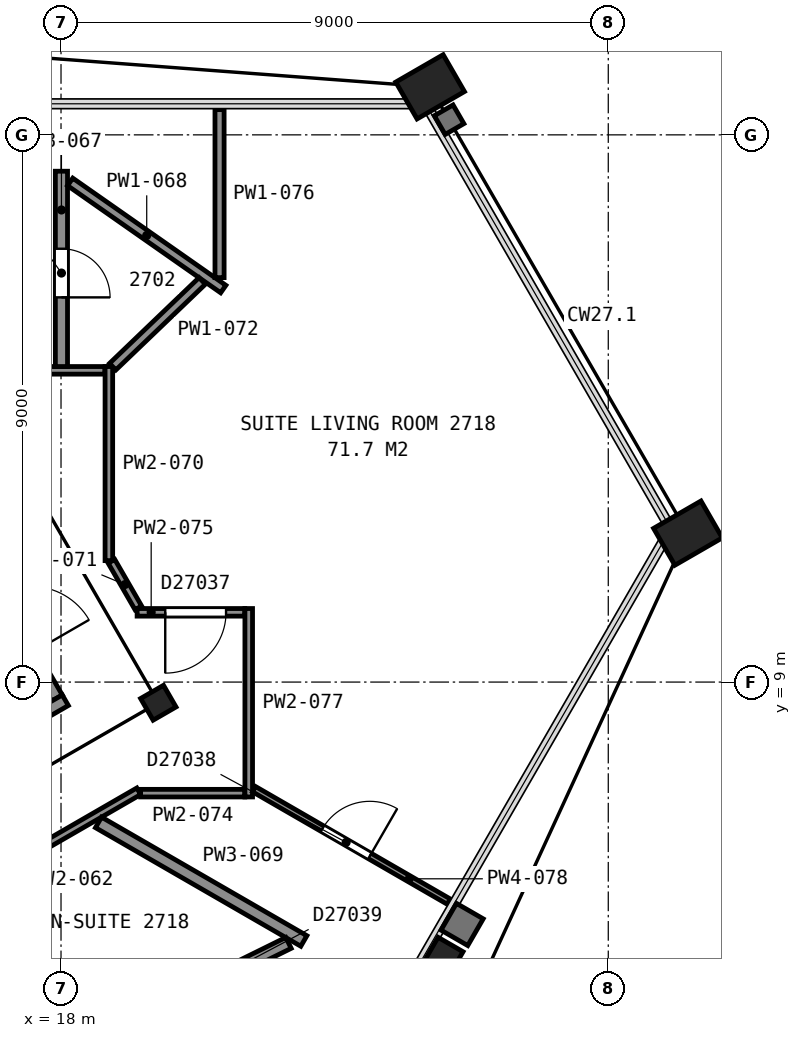
"""IFC4 building model, lengths in metres.
Left out: names, types, materials, properties, quantities, classifications, styles, units other than length and angle.
Written with IfcOpenShell. Run it as: python <this file> out.ifc"""

import sys

from ifc_helpers import new_model, si_unit, direction, frame, frame_2d, origin, origin_2d, place, context, subcontext, project, spatial, rectangle, hollow_rectangle, i_section, extrude, element, fill, save


model = new_model("IFC4")
c1 = context("Model", 3, precision=1e-05, world=origin(), true_north=direction((0.0, 1.0)))
c2 = subcontext(c1, "Body", "Model", "MODEL_VIEW")
j1 = project(units=[si_unit("LENGTHUNIT", "METRE"), si_unit("PLANEANGLEUNIT", "RADIAN")], contexts=[c1])
p1 = place(None, origin())
s1 = spatial("IfcSite", under=j1, at=p1, CompositionType="ELEMENT")
p2 = place(p1, origin())
s2 = spatial("IfcBuilding", under=s1, at=p2, CompositionType="ELEMENT")
p3 = place(p2, frame((0.0, 0.0, 114.4)))
s3 = spatial("IfcBuildingStorey", under=s2, at=p3, CompositionType="ELEMENT", Elevation=114.4)
p4 = place(p3, frame((24.07, 18.79, 0.0), z_axis=(0.0, 0.0, 1.0), x_axis=(0.5, -0.866025403784, 0.0)))
e1 = element("IfcColumn", 1, at=p4, inside=s3, PredefinedType="COLUMN", context=c2, shape_type="SweptSolid", body=[
    extrude(hollow_rectangle(XDim=0.7, YDim=0.9, WallThickness=0.065, at=origin_2d()), origin(), (0.0, 0.0, 1.0), 3.525),
])
p5 = place(p3, frame((24.3, 4.5, 0.0), z_axis=(0.0, 0.0, 1.0), x_axis=(-0.5, -0.866025403784, 0.0)))
e2 = element("IfcColumn", 2, at=p5, inside=s3, PredefinedType="COLUMN", context=c2, shape_type="SweptSolid", body=[
    extrude(i_section(OverallWidth=0.424, OverallDepth=0.475, WebThickness=0.048, FlangeThickness=0.077, FilletRadius=0.015, at=origin_2d()), origin(), (0.0, 0.0, 1.0), 3.555),
])
p6 = place(p3, frame((28.31, 11.45, 0.0), z_axis=(0.0, 0.0, 1.0), x_axis=(0.5, -0.866025403784, 0.0)))
e3 = element("IfcColumn", 3, at=p6, inside=s3, PredefinedType="COLUMN", context=c2, shape_type="SweptSolid", body=[
    extrude(hollow_rectangle(XDim=0.7, YDim=0.9, WallThickness=0.065, at=origin_2d()), origin(), (0.0, 0.0, 1.0), 3.525),
])
p7 = place(p3, frame((19.6, 8.66, 0.0), z_axis=(0.0, 0.0, 1.0), x_axis=(0.5, -0.866025403784, 0.0)))
e4 = element("IfcColumn", 4, at=p7, inside=s3, PredefinedType="COLUMN", context=c2, shape_type="SweptSolid", body=[
    extrude(i_section(OverallWidth=0.411, OverallDepth=0.434, WebThickness=0.036, FlangeThickness=0.057, FilletRadius=0.015, at=origin_2d()), origin(), (0.0, 0.0, 1.0), 3.6),
])
p8 = place(p3, frame((17.934, 8.738, 0.0), z_axis=(0.0, 0.0, 1.0), x_axis=(-0.49998411664, 0.866034573852, 0.0)))
e5 = element("IfcWall", 5, at=p8, inside=s3, PredefinedType="PARTITIONING", context=c2, shape_type="SweptSolid", body=[
    extrude(rectangle(XDim=2.8, YDim=0.2, at=frame_2d((1.4, 0.0))), origin(), (0.0, 0.0, 1.0), 3.35),
])
p9 = place(p8, frame((0.85, 0.0, 0.0)))
e6 = element("IfcOpeningElement", 6, at=p9, cuts=e5, PredefinedType="OPENING", context=c2, shape_type="SweptSolid", body=[
    extrude(rectangle(XDim=1.1, YDim=2.1, at=frame_2d((0.55, 1.05))), frame((0.0, 0.11, 0.0), z_axis=(0.0, -1.0, 0.0), x_axis=(1.0, 0.0, 0.0)), (0.0, 0.0, 1.0), 0.22),
])
p10 = place(p3, frame((7.678, 2.701, 0.0), z_axis=(0.0, 0.0, 1.0), x_axis=(0.866026010844, 0.49999894854, 0.0)))
e7 = element("IfcWall", 7, at=p10, inside=s3, PredefinedType="PARTITIONING", context=c2, shape_type="SweptSolid", body=[
    extrude(rectangle(XDim=12.0, YDim=0.2, at=frame_2d((6.0, 0.0))), origin(), (0.0, 0.0, 1.0), 3.35),
])
p11 = place(p3, frame((15.727, 5.154, 0.0), z_axis=(0.0, 0.0, 1.0), x_axis=(0.865992261418, 0.50005739987, 0.0)))
e8 = element("IfcWall", 8, at=p11, inside=s3, PredefinedType="PARTITIONING", context=c2, shape_type="SweptSolid", body=[
    extrude(rectangle(XDim=4.101, YDim=0.125, at=frame_2d((2.051, 0.0))), origin(), (0.0, 0.0, 1.0), 2.613),
])
p12 = place(p3, frame((15.75, 14.127, 0.0), z_axis=(0.0, 0.0, 1.0), x_axis=(1.0, 0.0, 0.0)))
e9 = element("IfcWall", 9, at=p12, inside=s3, PredefinedType="PARTITIONING", context=c2, shape_type="SweptSolid", body=[
    extrude(rectangle(XDim=2.971, YDim=0.125, at=frame_2d((1.486, 0.0))), origin(), (0.0, 0.0, 1.0), 2.613),
])
p13 = place(p3, frame((16.004, 5.198, 0.0), z_axis=(0.0, 0.0, 1.0), x_axis=(0.866025331845, -0.500000124603, 0.0)))
e10 = element("IfcWall", 10, at=p13, inside=s3, PredefinedType="PARTITIONING", context=c2, shape_type="SweptSolid", body=[
    extrude(rectangle(XDim=7.154, YDim=0.15, at=frame_2d((3.577, 0.0))), origin(), (0.0, 0.0, 1.0), 2.613),
])
p14 = place(p3, frame((18.007, 17.402, 0.0), z_axis=(0.0, 0.0, 1.0), x_axis=(0.0, -1.0, 0.0)))
e11 = element("IfcWall", 11, at=p14, inside=s3, PredefinedType="PARTITIONING", context=c2, shape_type="SweptSolid", body=[
    extrude(rectangle(XDim=3.213, YDim=0.2, at=frame_2d((1.606, 0.0))), origin(), (0.0, 0.0, 1.0), 2.613),
])
p15 = place(p14, frame((1.275, 0.0, 0.0)))
e12 = element("IfcOpeningElement", 12, at=p15, cuts=e11, PredefinedType="OPENING", context=c2, shape_type="SweptSolid", body=[
    extrude(rectangle(XDim=0.8, YDim=2.1, at=frame_2d((0.4, 1.05))), frame((0.0, 0.11, 0.0), z_axis=(0.0, -1.0, 0.0), x_axis=(1.0, 0.0, 0.0)), (0.0, 0.0, 1.0), 0.22),
])
p16 = place(p3, frame((18.15, 17.227, 0.0), z_axis=(0.0, 0.0, 1.0), x_axis=(0.819261773051, -0.573419695526, 0.0)))
e13 = element("IfcWall", 13, at=p16, inside=s3, PredefinedType="PARTITIONING", context=c2, shape_type="SweptSolid", body=[
    extrude(rectangle(XDim=3.073, YDim=0.15, at=frame_2d((1.537, 0.0))), origin(), (0.0, 0.0, 1.0), 2.613),
])
p17 = place(p3, frame((18.616, 6.692, 0.0), z_axis=(0.0, 0.0, 1.0), x_axis=(0.865984367075, -0.500071070931, 0.0)))
e14 = element("IfcWall", 14, at=p17, inside=s3, PredefinedType="PARTITIONING", context=c2, shape_type="SweptSolid", body=[
    extrude(rectangle(XDim=3.9, YDim=0.2, at=frame_2d((1.95, 0.0))), origin(), (0.0, 0.0, 1.0), 2.613),
])
p18 = place(p3, frame((18.787, 10.998, 0.0), z_axis=(0.0, 0.0, 1.0), x_axis=(0.0, 1.0, 0.0)))
e15 = element("IfcWall", 15, at=p18, inside=s3, PredefinedType="PARTITIONING", context=c2, shape_type="SweptSolid", body=[
    extrude(rectangle(XDim=3.192, YDim=0.125, at=frame_2d((1.596, 0.0))), origin(), (0.0, 0.0, 1.0), 2.613),
])
p19 = place(p3, frame((18.83, 10.986, 0.0), z_axis=(0.0, 0.0, 1.0), x_axis=(0.499881837328, -0.866093614288, 0.0)))
e16 = element("IfcWall", 16, at=p19, inside=s3, PredefinedType="PARTITIONING", context=c2, shape_type="SweptSolid", body=[
    extrude(rectangle(XDim=0.884, YDim=0.125, at=frame_2d((0.442, 0.0))), origin(), (0.0, 0.0, 1.0), 2.613),
])
p20 = place(p3, frame((18.85, 14.188, 0.0), z_axis=(0.0, 0.0, 1.0), x_axis=(0.722035565689, 0.69185594012, 0.0)))
e17 = element("IfcWall", 17, at=p20, inside=s3, PredefinedType="PARTITIONING", context=c2, shape_type="SweptSolid", body=[
    extrude(rectangle(XDim=2.039, YDim=0.15, at=frame_2d((1.019, 0.0))), origin(), (0.0, 0.0, 1.0), 2.613),
])
p21 = place(p3, frame((19.245, 3.479, 0.0), z_axis=(0.0, 0.0, 1.0), x_axis=(0.896782684503, 0.44247126096, 0.0)))
e18 = element("IfcWall", 18, at=p21, inside=s3, PredefinedType="PARTITIONING", context=c2, shape_type="SweptSolid", body=[
    extrude(rectangle(XDim=2.784, YDim=0.2, at=frame_2d((1.392, 0.0))), origin(), (0.0, 0.0, 1.0), 2.613),
])
p22 = place(p21, frame((0.993, 0.0, 0.0)))
e19 = element("IfcOpeningElement", 19, at=p22, cuts=e18, PredefinedType="OPENING", context=c2, shape_type="SweptSolid", body=[
    extrude(rectangle(XDim=0.8, YDim=2.1, at=frame_2d((0.4, 1.05))), frame((0.0, 0.11, 0.0), z_axis=(0.0, -1.0, 0.0), x_axis=(1.0, 0.0, 0.0)), (0.0, 0.0, 1.0), 0.22),
])
p23 = place(p3, frame((19.309, 7.173, 0.0), z_axis=(0.0, 0.0, 1.0), x_axis=(1.0, 0.0, 0.0)))
e20 = element("IfcWall", 20, at=p23, inside=s3, PredefinedType="PARTITIONING", context=c2, shape_type="SweptSolid", body=[
    extrude(rectangle(XDim=1.713, YDim=0.125, at=frame_2d((0.856, 0.0))), origin(), (0.0, 0.0, 1.0), 2.613),
])
p24 = place(p3, frame((19.251, 10.147, 0.0), z_axis=(0.0, 0.0, 1.0), x_axis=(1.0, 0.0, 0.0)))
e21 = element("IfcWall", 21, at=p24, inside=s3, PredefinedType="PARTITIONING", context=c2, shape_type="SweptSolid", body=[
    extrude(rectangle(XDim=1.771, YDim=0.125, at=frame_2d((0.885, 0.0))), origin(), (0.0, 0.0, 1.0), 2.613),
])
p25 = place(p24, frame((0.462, 0.0, 0.0)))
e22 = element("IfcOpeningElement", 22, at=p25, cuts=e21, PredefinedType="OPENING", context=c2, shape_type="SweptSolid", body=[
    extrude(rectangle(XDim=1.0, YDim=2.1, at=frame_2d((0.5, 1.05))), frame((0.0, 0.073, 0.0), z_axis=(0.0, -1.0, 0.0), x_axis=(1.0, 0.0, 0.0)), (0.0, 0.0, 1.0), 0.145),
])
p26 = place(p3, frame((20.607, 15.652, 0.0), z_axis=(0.0, 0.0, 1.0), x_axis=(0.0, 1.0, 0.0)))
e23 = element("IfcWall", 23, at=p26, inside=s3, PredefinedType="PARTITIONING", context=c2, shape_type="SweptSolid", body=[
    extrude(rectangle(XDim=2.763, YDim=0.15, at=frame_2d((1.381, 0.0))), origin(), (0.0, 0.0, 1.0), 2.613),
])
p27 = place(p3, frame((21.087, 7.111, 0.0), z_axis=(0.0, 0.0, 1.0), x_axis=(0.0, 1.0, 0.0)))
e24 = element("IfcWall", 24, at=p27, inside=s3, PredefinedType="PARTITIONING", context=c2, shape_type="SweptSolid", body=[
    extrude(rectangle(XDim=3.099, YDim=0.125, at=frame_2d((1.549, 0.0))), origin(), (0.0, 0.0, 1.0), 2.613),
])
p28 = place(p3, frame((24.376, 5.39, 0.0), z_axis=(0.0, 0.0, 1.0), x_axis=(-0.865974401185, 0.500088328689, 0.0)))
e25 = element("IfcWall", 25, at=p28, inside=s3, PredefinedType="PARTITIONING", context=c2, shape_type="SweptSolid", body=[
    extrude(rectangle(XDim=3.697, YDim=0.1, at=frame_2d((1.848, 0.0))), origin(), (0.0, 0.0, 1.0), 2.613),
])
p29 = place(p28, frame((1.498, 0.0, 0.0)))
e26 = element("IfcOpeningElement", 26, at=p29, cuts=e25, PredefinedType="OPENING", context=c2, shape_type="SweptSolid", body=[
    extrude(rectangle(XDim=0.9, YDim=2.1, at=frame_2d((0.45, 1.05))), frame((0.0, 0.06, 0.0), z_axis=(0.0, -1.0, 0.0), x_axis=(1.0, 0.0, 0.0)), (0.0, 0.0, 1.0), 0.12),
])
p30 = place(p15, origin())
e27 = element("IfcDoor", 27, at=p30, inside=s3, OperationType="SINGLE_SWING_RIGHT", PredefinedType="DOOR", context=c2, shape_type="SweptSolid", body=[
    extrude(rectangle(XDim=0.8, YDim=2.1, at=frame_2d((0.4, 1.05))), frame((0.0, 0.025, 0.0), z_axis=(0.0, -1.0, 0.0), x_axis=(1.0, 0.0, 0.0)), (0.0, 0.0, 1.0), 0.05),
])
fill(e12, e27)
p31 = place(p25, origin())
e28 = element("IfcDoor", 28, at=p31, inside=s3, OperationType="SINGLE_SWING_LEFT", PredefinedType="DOOR", context=c2, shape_type="SweptSolid", body=[
    extrude(rectangle(XDim=1.0, YDim=2.1, at=frame_2d((0.5, 1.05))), frame((0.0, 0.025, 0.0), z_axis=(0.0, -1.0, 0.0), x_axis=(1.0, 0.0, 0.0)), (0.0, 0.0, 1.0), 0.05),
])
fill(e22, e28)
p32 = place(p29, origin())
e29 = element("IfcDoor", 29, at=p32, inside=s3, OperationType="SINGLE_SWING_LEFT", PredefinedType="DOOR", context=c2, shape_type="SweptSolid", body=[
    extrude(rectangle(XDim=0.9, YDim=2.1, at=frame_2d((0.45, 1.05))), frame((0.0, 0.025, 0.0), z_axis=(0.0, -1.0, 0.0), x_axis=(1.0, 0.0, 0.0)), (0.0, 0.0, 1.0), 0.05),
])
fill(e26, e29)
save(model, sys.argv[1])
